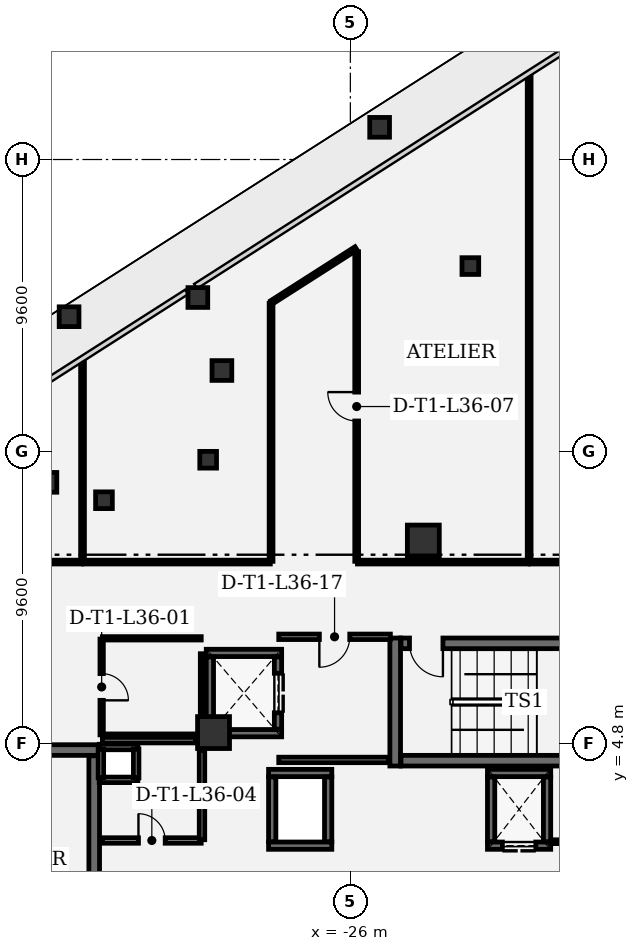
"""IFC4 building model, lengths in metres.
Left out: names, types, materials, properties, quantities, classifications, styles, units other than length and angle.
Written with IfcOpenShell. Run it as: python <this file> out.ifc"""

import sys

from ifc_helpers import new_model, si_unit, direction, frame, frame_2d, origin, origin_2d, place, context, subcontext, project, spatial, rectangle, extrude, element, fill, save


model = new_model("IFC4")
c1 = context("Model", 3, precision=1e-05, world=origin(), true_north=direction((0.0, 1.0)))
c2 = subcontext(c1, "Body", "Model", "MODEL_VIEW")
j1 = project(units=[si_unit("LENGTHUNIT", "METRE"), si_unit("PLANEANGLEUNIT", "RADIAN")], contexts=[c1])
p1 = place(None, origin())
s1 = spatial("IfcSite", under=j1, at=p1, CompositionType="ELEMENT")
p2 = place(p1, origin())
s2 = spatial("IfcBuilding", under=s1, at=p2, CompositionType="ELEMENT")
p3 = place(p2, frame((0.0, 0.0, 158.4)))
s3 = spatial("IfcBuildingStorey", under=s2, at=p3, CompositionType="ELEMENT", Elevation=158.4)
for number, where, z_axis, x_axis in (
    (1, (-23.6, 11.45, 0.0), (0.0, 0.0, 1.0), (1.0, 0.0, 0.0)),
    (2, (-30.5, 5.15, 0.0), (0.0, 0.0, 1.0), (1.0, 0.0, 0.0)),
):
    element("IfcColumn", number, at=place(p3, frame(where, z_axis=z_axis, x_axis=x_axis)), inside=s3, PredefinedType="COLUMN", context=c2, shape_type="SweptSolid", body=[
        extrude(rectangle(XDim=1.05, YDim=1.05, at=origin_2d()), origin(), (0.0, 0.0, 1.0), 4.05),
    ])
for number, where, z_axis, x_axis in (
    (3, (-35.252, 18.829, 0.0), (0.0, 0.0, 1.0), (1.0, 0.0, 0.0)),
    (4, (-25.038, 25.059, 0.0), (0.0, 0.0, 1.0), (1.0, 0.0, 0.0)),
    (5, (-31.016, 19.46, 0.0), (0.0, 0.0, 1.0), (1.0, 0.0, 0.0)),
    (6, (-35.981, 13.381, 0.0), (0.0, 0.0, 1.0), (1.0, 0.0, 0.0)),
    (7, (-30.225, 17.06, 0.0), (0.0, 0.0, 1.0), (1.0, 0.0, 0.0)),
):
    element("IfcColumn", number, at=place(p3, frame(where, z_axis=z_axis, x_axis=x_axis)), inside=s3, PredefinedType="COLUMN", context=c2, shape_type="SweptSolid", body=[
        extrude(rectangle(XDim=0.65, YDim=0.65, at=origin_2d()), origin(), (0.0, 0.0, 1.0), 4.05),
    ])
for number, where, z_axis, x_axis in (
    (8, (-34.104, 12.792, 0.0), (0.0, 0.0, 1.0), (1.0, 0.0, 0.0)),
    (9, (-22.053, 20.495, 0.0), (0.0, 0.0, 1.0), (1.0, 0.0, 0.0)),
    (10, (-30.677, 14.124, 0.0), (0.0, 0.0, 1.0), (1.0, 0.0, 0.0)),
):
    element("IfcColumn", number, at=place(p3, frame(where, z_axis=z_axis, x_axis=x_axis)), inside=s3, PredefinedType="COLUMN", context=c2, shape_type="SweptSolid", body=[
        extrude(rectangle(XDim=0.55, YDim=0.55, at=origin_2d()), origin(), (0.0, 0.0, 1.0), 4.05),
    ])
p4 = place(p3, frame((-24.525, 8.26, 0.0), z_axis=(0.0, 0.0, 1.0), x_axis=(0.0, -1.0, 0.0)))
e11 = element("IfcWall", 11, at=p4, inside=s3, PredefinedType="SHEAR", context=c2, shape_type="SweptSolid", body=[
    extrude(rectangle(XDim=4.21, YDim=0.35, at=frame_2d((2.105, 0.0))), origin(), (0.0, 0.0, 1.0), 3.78),
])
p5 = place(p3, frame((-24.335, 4.225, 0.0), z_axis=(0.0, 0.0, 1.0), x_axis=(1.0, 0.0, 0.0)))
e12 = element("IfcWall", 12, at=p5, inside=s3, PredefinedType="SHEAR", context=c2, shape_type="SweptSolid", body=[
    extrude(rectangle(XDim=8.12, YDim=0.35, at=frame_2d((4.06, 0.0))), origin(), (0.0, 0.0, 1.0), 3.78),
])
p6 = place(p3, frame((-16.215, 8.085, 0.0), z_axis=(0.0, 0.0, 1.0), x_axis=(-1.0, 0.0, 0.0)))
e13 = element("IfcWall", 13, at=p6, inside=s3, PredefinedType="SHEAR", context=c2, shape_type="SweptSolid", body=[
    extrude(rectangle(XDim=8.12, YDim=0.35, at=frame_2d((4.06, 0.0))), origin(), (0.0, 0.0, 1.0), 3.78),
])
p7 = place(p6, frame((6.74, 0.0, 0.0)))
e14 = element("IfcOpeningElement", 14, at=p7, cuts=e13, PredefinedType="OPENING", context=c2, shape_type="SweptSolid", body=[
    extrude(rectangle(XDim=1.1, YDim=2.2, at=frame_2d((0.55, 1.1))), frame((0.0, 0.185, 0.0), z_axis=(0.0, -1.0, 0.0), x_axis=(1.0, 0.0, 0.0)), (0.0, 0.0, 1.0), 0.37),
])
p8 = place(p3, frame((-34.25, 4.575, 0.0), z_axis=(0.0, 0.0, 1.0), x_axis=(-1.0, 0.0, 0.0)))
e15 = element("IfcWall", 15, at=p8, inside=s3, PredefinedType="SHEAR", context=c2, shape_type="SweptSolid", body=[
    extrude(rectangle(XDim=4.21, YDim=0.35, at=frame_2d((2.105, 0.0))), origin(), (0.0, 0.0, 1.0), 3.78),
])
p9 = place(p3, frame((-34.425, -4.385, 0.0), z_axis=(0.0, 0.0, 1.0), x_axis=(0.0, 1.0, 0.0)))
e16 = element("IfcWall", 16, at=p9, inside=s3, PredefinedType="SHEAR", context=c2, shape_type="SweptSolid", body=[
    extrude(rectangle(XDim=8.77, YDim=0.35, at=frame_2d((4.385, 0.0))), origin(), (0.0, 0.0, 1.0), 3.78),
])
for number, where, z_axis, x_axis in (
    (17, (-28.26, 5.13, 0.0), (0.0, 0.0, 1.0), (-1.0, 0.0, 0.0)),
    (18, (-30.74, 7.77, 0.0), (0.0, 0.0, 1.0), (1.0, 0.0, 0.0)),
):
    element("IfcWall", number, at=place(p3, frame(where, z_axis=z_axis, x_axis=x_axis)), inside=s3, PredefinedType="SHEAR", context=c2, shape_type="SweptSolid", body=[
        extrude(rectangle(XDim=2.48, YDim=0.24, at=frame_2d((1.24, 0.0))), origin(), (0.0, 0.0, 1.0), 3.78),
    ])
p10 = place(p3, frame((-30.62, 5.262, 0.0), z_axis=(0.0, 0.0, 1.0), x_axis=(0.0, 1.0, 0.0)))
e19 = element("IfcWall", 19, at=p10, inside=s3, PredefinedType="SHEAR", context=c2, shape_type="SweptSolid", body=[
    extrude(rectangle(XDim=2.376, YDim=0.24, at=frame_2d((1.188, 0.0))), origin(), (0.0, 0.0, 1.0), 3.78),
])
p11 = place(p3, frame((-28.38, 7.638, 0.0), z_axis=(0.0, 0.0, 1.0), x_axis=(0.0, -1.0, 0.0)))
e20 = element("IfcWall", 20, at=p11, inside=s3, PredefinedType="SHEAR", context=c2, shape_type="SweptSolid", body=[
    extrude(rectangle(XDim=2.376, YDim=0.24, at=frame_2d((1.188, 0.0))), origin(), (0.0, 0.0, 1.0), 3.78),
])
p12 = place(p11, frame((0.538, 0.0, 0.0)))
e21 = element("IfcOpeningElement", 21, at=p12, cuts=e20, PredefinedType="OPENING", context=c2, shape_type="SweptSolid", body=[
    extrude(rectangle(XDim=1.3, YDim=2.3, at=frame_2d((0.65, 1.15))), frame((0.0, 0.13, 0.0), z_axis=(0.0, -1.0, 0.0), x_axis=(1.0, 0.0, 0.0)), (0.0, 0.0, 1.0), 0.26),
])
for number, where, z_axis, x_axis in (
    (22, (-26.61, 1.43, 0.0), (0.0, 0.0, 1.0), (-1.0, 0.0, 0.0)),
    (23, (-28.69, 3.82, 0.0), (0.0, 0.0, 1.0), (1.0, 0.0, 0.0)),
):
    element("IfcWall", number, at=place(p3, frame(where, z_axis=z_axis, x_axis=x_axis)), inside=s3, PredefinedType="SHEAR", context=c2, shape_type="SweptSolid", body=[
        extrude(rectangle(XDim=2.08, YDim=0.24, at=frame_2d((1.04, 0.0))), origin(), (0.0, 0.0, 1.0), 3.78),
    ])
for number, where, z_axis, x_axis in (
    (24, (-28.57, 1.562, 0.0), (0.0, 0.0, 1.0), (0.0, 1.0, 0.0)),
    (25, (-26.73, 3.688, 0.0), (0.0, 0.0, 1.0), (0.0, -1.0, 0.0)),
):
    element("IfcWall", number, at=place(p3, frame(where, z_axis=z_axis, x_axis=x_axis)), inside=s3, PredefinedType="SHEAR", context=c2, shape_type="SweptSolid", body=[
        extrude(rectangle(XDim=2.126, YDim=0.24, at=frame_2d((1.063, 0.0))), origin(), (0.0, 0.0, 1.0), 3.78),
    ])
p13 = place(p3, frame((-19.41, 1.43, 0.0), z_axis=(0.0, 0.0, 1.0), x_axis=(-1.0, 0.0, 0.0)))
e26 = element("IfcWall", 26, at=p13, inside=s3, PredefinedType="SHEAR", context=c2, shape_type="SweptSolid", body=[
    extrude(rectangle(XDim=2.08, YDim=0.24, at=frame_2d((1.04, 0.0))), origin(), (0.0, 0.0, 1.0), 3.78),
])
p14 = place(p13, frame((0.49, 0.0, 0.0)))
e27 = element("IfcOpeningElement", 27, at=p14, cuts=e26, PredefinedType="OPENING", context=c2, shape_type="SweptSolid", body=[
    extrude(rectangle(XDim=1.1, YDim=2.2, at=frame_2d((0.55, 1.1))), frame((0.0, 0.13, 0.0), z_axis=(0.0, -1.0, 0.0), x_axis=(1.0, 0.0, 0.0)), (0.0, 0.0, 1.0), 0.26),
])
p15 = place(p3, frame((-21.49, 3.82, 0.0), z_axis=(0.0, 0.0, 1.0), x_axis=(1.0, 0.0, 0.0)))
e28 = element("IfcWall", 28, at=p15, inside=s3, PredefinedType="SHEAR", context=c2, shape_type="SweptSolid", body=[
    extrude(rectangle(XDim=2.08, YDim=0.24, at=frame_2d((1.04, 0.0))), origin(), (0.0, 0.0, 1.0), 3.78),
])
for number, where, z_axis, x_axis in (
    (29, (-21.37, 1.562, 0.0), (0.0, 0.0, 1.0), (0.0, 1.0, 0.0)),
    (30, (-19.53, 3.688, 0.0), (0.0, 0.0, 1.0), (0.0, -1.0, 0.0)),
):
    element("IfcWall", number, at=place(p3, frame(where, z_axis=z_axis, x_axis=x_axis)), inside=s3, PredefinedType="SHEAR", context=c2, shape_type="SweptSolid", body=[
        extrude(rectangle(XDim=2.126, YDim=0.24, at=frame_2d((1.063, 0.0))), origin(), (0.0, 0.0, 1.0), 3.78),
    ])
for number, where, z_axis, x_axis in (
    (31, (-32.99, 3.595, 0.0), (0.0, 0.0, 1.0), (-1.0, 0.0, 0.0)),
    (32, (-34.26, 4.675, 0.0), (0.0, 0.0, 1.0), (1.0, 0.0, 0.0)),
):
    element("IfcWall", number, at=place(p3, frame(where, z_axis=z_axis, x_axis=x_axis)), inside=s3, PredefinedType="PARTITIONING", context=c2, shape_type="SweptSolid", body=[
        extrude(rectangle(XDim=1.27, YDim=0.18, at=frame_2d((0.635, 0.0))), origin(), (0.0, 0.0, 1.0), 3.78),
    ])
for number, where, z_axis, x_axis in (
    (33, (-34.205, 3.66, 0.0), (0.0, 0.0, 1.0), (0.0, 1.0, 0.0)),
    (34, (-33.045, 4.61, 0.0), (0.0, 0.0, 1.0), (0.0, -1.0, 0.0)),
):
    element("IfcWall", number, at=place(p3, frame(where, z_axis=z_axis, x_axis=x_axis)), inside=s3, PredefinedType="PARTITIONING", context=c2, shape_type="SweptSolid", body=[
        extrude(rectangle(XDim=0.95, YDim=0.18, at=frame_2d((0.475, 0.0))), origin(), (0.0, 0.0, 1.0), 3.78),
    ])
p16 = place(p3, frame((-28.355, 4.25, 0.0), z_axis=(0.0, 0.0, 1.0), x_axis=(1.0, 0.0, 0.0)))
e35 = element("IfcWall", 35, at=p16, inside=s3, PredefinedType="PARTITIONING", context=c2, shape_type="SweptSolid", body=[
    extrude(rectangle(XDim=3.622, YDim=0.18, at=frame_2d((1.811, 0.0))), origin(), (0.0, 0.0, 1.0), 3.78),
])
p17 = place(p3, frame((-24.684, 8.3, 0.0), z_axis=(0.0, 0.0, 1.0), x_axis=(-1.0, 0.0, 0.0)))
e36 = element("IfcWall", 36, at=p17, inside=s3, PredefinedType="PARTITIONING", context=c2, shape_type="SweptSolid", body=[
    extrude(rectangle(XDim=3.671, YDim=0.18, at=frame_2d((1.835, 0.0))), origin(), (0.0, 0.0, 1.0), 3.78),
])
p18 = place(p17, frame((1.335, 0.0, 0.0)))
e37 = element("IfcOpeningElement", 37, at=p18, cuts=e36, PredefinedType="OPENING", context=c2, shape_type="SweptSolid", body=[
    extrude(rectangle(XDim=1.0, YDim=2.15, at=frame_2d((0.5, 1.075))), frame((0.0, 0.1, 0.0), z_axis=(0.0, -1.0, 0.0), x_axis=(1.0, 0.0, 0.0)), (0.0, 0.0, 1.0), 0.2),
])
p19 = place(p3, frame((-34.18, 8.225, 0.0), z_axis=(0.0, 0.0, 1.0), x_axis=(0.0, -1.0, 0.0)))
e38 = element("IfcWall", 38, at=p19, inside=s3, PredefinedType="PARTITIONING", context=c2, shape_type="SweptSolid", body=[
    extrude(rectangle(XDim=3.15, YDim=0.11, at=frame_2d((1.575, 0.0))), origin(), (0.0, 0.0, 1.0), 3.78),
])
p20 = place(p19, frame((1.135, 0.0, 0.0)))
e39 = element("IfcOpeningElement", 39, at=p20, cuts=e38, PredefinedType="OPENING", context=c2, shape_type="SweptSolid", body=[
    extrude(rectangle(XDim=0.88, YDim=2.1, at=frame_2d((0.44, 1.05))), frame((0.0, 0.065, 0.0), z_axis=(0.0, -1.0, 0.0), x_axis=(1.0, 0.0, 0.0)), (0.0, 0.0, 1.0), 0.13),
])
p21 = place(p3, frame((-34.155, 5.05, 0.0), z_axis=(0.0, 0.0, 1.0), x_axis=(1.0, 0.0, 0.0)))
e40 = element("IfcWall", 40, at=p21, inside=s3, PredefinedType="PARTITIONING", context=c2, shape_type="SweptSolid", body=[
    extrude(rectangle(XDim=3.065, YDim=0.11, at=frame_2d((1.532, 0.0))), origin(), (0.0, 0.0, 1.0), 3.78),
])
p22 = place(p3, frame((-30.88, 5.74, 0.0), z_axis=(0.0, 0.0, 1.0), x_axis=(0.0, 1.0, 0.0)))
e41 = element("IfcWall", 41, at=p22, inside=s3, PredefinedType="PARTITIONING", context=c2, shape_type="SweptSolid", body=[
    extrude(rectangle(XDim=2.003, YDim=0.11, at=frame_2d((1.001, 0.0))), origin(), (0.0, 0.0, 1.0), 3.78),
])
p23 = place(p3, frame((-30.905, 8.25, 0.0), z_axis=(0.0, 0.0, 1.0), x_axis=(-1.0, 0.0, 0.0)))
e42 = element("IfcWall", 42, at=p23, inside=s3, PredefinedType="PARTITIONING", context=c2, shape_type="SweptSolid", body=[
    extrude(rectangle(XDim=3.25, YDim=0.11, at=frame_2d((1.625, 0.0))), origin(), (0.0, 0.0, 1.0), 3.78),
])
p24 = place(p3, frame((-19.334, 1.56, 0.0), z_axis=(0.0, 0.0, 1.0), x_axis=(1.0, 0.0, 0.0)))
e43 = element("IfcWall", 43, at=p24, inside=s3, PredefinedType="PARTITIONING", context=c2, shape_type="SweptSolid", body=[
    extrude(rectangle(XDim=3.309, YDim=0.125, at=frame_2d((1.654, 0.0))), origin(), (0.0, 0.0, 1.0), 3.78),
])
p25 = place(p24, frame((1.179, 0.0, 0.0)))
e44 = element("IfcOpeningElement", 44, at=p25, cuts=e43, PredefinedType="OPENING", context=c2, shape_type="SweptSolid", body=[
    extrude(rectangle(XDim=0.95, YDim=2.15, at=frame_2d((0.475, 1.075))), frame((0.0, 0.073, 0.0), z_axis=(0.0, -1.0, 0.0), x_axis=(1.0, 0.0, 0.0)), (0.0, 0.0, 1.0), 0.145),
])
p26 = place(p3, frame((-34.155, 1.6, 0.0), z_axis=(0.0, 0.0, 1.0), x_axis=(1.0, 0.0, 0.0)))
e45 = element("IfcWall", 45, at=p26, inside=s3, PredefinedType="PARTITIONING", context=c2, shape_type="SweptSolid", body=[
    extrude(rectangle(XDim=3.25, YDim=0.18, at=frame_2d((1.625, 0.0))), origin(), (0.0, 0.0, 1.0), 3.78),
])
p27 = place(p26, frame((1.185, 0.0, 0.0)))
e46 = element("IfcOpeningElement", 46, at=p27, cuts=e45, PredefinedType="OPENING", context=c2, shape_type="SweptSolid", body=[
    extrude(rectangle(XDim=0.88, YDim=2.1, at=frame_2d((0.44, 1.05))), frame((0.0, 0.1, 0.0), z_axis=(0.0, -1.0, 0.0), x_axis=(1.0, 0.0, 0.0)), (0.0, 0.0, 1.0), 0.2),
])
p28 = place(p3, frame((-30.88, 1.625, 0.0), z_axis=(0.0, 0.0, 1.0), x_axis=(0.0, 1.0, 0.0)))
e47 = element("IfcWall", 47, at=p28, inside=s3, PredefinedType="PARTITIONING", context=c2, shape_type="SweptSolid", body=[
    extrude(rectangle(XDim=2.935, YDim=0.18, at=frame_2d((1.468, 0.0))), origin(), (0.0, 0.0, 1.0), 3.78),
])
p29 = place(p3, frame((-31.09, 4.9, 0.0), z_axis=(0.0, 0.0, 1.0), x_axis=(-1.0, 0.0, 0.0)))
e48 = element("IfcWall", 48, at=p29, inside=s3, PredefinedType="PARTITIONING", context=c2, shape_type="SweptSolid", body=[
    extrude(rectangle(XDim=3.065, YDim=0.18, at=frame_2d((1.532, 0.0))), origin(), (0.0, 0.0, 1.0), 3.78),
])
p30 = place(p3, frame((-37.833, 10.758, 0.0), z_axis=(0.0, 0.0, 1.0), x_axis=(1.0, 0.0, 0.0)))
e49 = element("IfcWall", 49, at=p30, inside=s3, PredefinedType="PARTITIONING", context=c2, shape_type="SweptSolid", body=[
    extrude(rectangle(XDim=2.999, YDim=0.125, at=frame_2d((1.5, 0.0))), origin(), (0.0, 0.0, 1.0), 3.344),
])
p31 = place(p30, frame((1.024, 0.0, 0.0)))
e50 = element("IfcOpeningElement", 50, at=p31, cuts=e49, PredefinedType="OPENING", context=c2, shape_type="SweptSolid", body=[
    extrude(rectangle(XDim=0.95, YDim=2.15, at=frame_2d((0.475, 1.075))), frame((0.0, 0.073, 0.0), z_axis=(0.0, -1.0, 0.0), x_axis=(1.0, 0.0, 0.0)), (0.0, 0.0, 1.0), 0.145),
])
p32 = place(p3, frame((-34.809, 10.783, 0.0), z_axis=(0.0, 0.0, 1.0), x_axis=(0.0, 1.0, 0.0)))
e51 = element("IfcWall", 51, at=p32, inside=s3, PredefinedType="PARTITIONING", context=c2, shape_type="SweptSolid", body=[
    extrude(rectangle(XDim=6.592, YDim=0.125, at=frame_2d((3.296, 0.0))), origin(), (0.0, 0.0, 1.0), 3.78),
])
p33 = place(p3, frame((-34.776, 10.758, 0.0), z_axis=(0.0, 0.0, 1.0), x_axis=(1.0, 0.0, 0.0)))
e52 = element("IfcWall", 52, at=p33, inside=s3, PredefinedType="PARTITIONING", context=c2, shape_type="SweptSolid", body=[
    extrude(rectangle(XDim=6.144, YDim=0.125, at=frame_2d((3.072, 0.0))), origin(), (0.0, 0.0, 1.0), 3.344),
])
p34 = place(p3, frame((-28.608, 19.267, 0.0), z_axis=(0.0, 0.0, 1.0), x_axis=(0.0, -1.0, 0.0)))
e53 = element("IfcWall", 53, at=p34, inside=s3, PredefinedType="PARTITIONING", context=c2, shape_type="SweptSolid", body=[
    extrude(rectangle(XDim=8.483, YDim=0.125, at=frame_2d((4.242, 0.0))), origin(), (0.0, 0.0, 1.0), 3.78),
])
p35 = place(p3, frame((-25.813, 21.078, 0.0), z_axis=(0.0, 0.0, 1.0), x_axis=(-0.842597176941, -0.538544331891, 0.0)))
e54 = element("IfcWall", 54, at=p35, inside=s3, PredefinedType="PARTITIONING", context=c2, shape_type="SweptSolid", body=[
    extrude(rectangle(XDim=3.292, YDim=0.125, at=frame_2d((1.646, 0.0))), origin(), (0.0, 0.0, 1.0), 3.78),
])
p36 = place(p3, frame((-25.792, 10.783, 0.0), z_axis=(0.0, 0.0, 1.0), x_axis=(0.0, 1.0, 0.0)))
e55 = element("IfcWall", 55, at=p36, inside=s3, PredefinedType="PARTITIONING", context=c2, shape_type="SweptSolid", body=[
    extrude(rectangle(XDim=10.182, YDim=0.125, at=frame_2d((5.091, 0.0))), origin(), (0.0, 0.0, 1.0), 3.78),
])
p37 = place(p36, frame((4.616, 0.0, 0.0)))
e56 = element("IfcOpeningElement", 56, at=p37, cuts=e55, PredefinedType="OPENING", context=c2, shape_type="SweptSolid", body=[
    extrude(rectangle(XDim=0.95, YDim=2.15, at=frame_2d((0.475, 1.075))), frame((0.0, 0.073, 0.0), z_axis=(0.0, -1.0, 0.0), x_axis=(1.0, 0.0, 0.0)), (0.0, 0.0, 1.0), 0.145),
])
p38 = place(p3, frame((-25.767, 10.758, 0.0), z_axis=(0.0, 0.0, 1.0), x_axis=(1.0, 0.0, 0.0)))
e57 = element("IfcWall", 57, at=p38, inside=s3, PredefinedType="PARTITIONING", context=c2, shape_type="SweptSolid", body=[
    extrude(rectangle(XDim=5.623, YDim=0.125, at=frame_2d((2.812, 0.0))), origin(), (0.0, 0.0, 1.0), 3.78),
])
p39 = place(p3, frame((-20.119, 10.783, 0.0), z_axis=(0.0, 0.0, 1.0), x_axis=(0.0, 1.0, 0.0)))
e58 = element("IfcWall", 58, at=p39, inside=s3, PredefinedType="PARTITIONING", context=c2, shape_type="SweptSolid", body=[
    extrude(rectangle(XDim=15.981, YDim=0.125, at=frame_2d((7.99, 0.0))), origin(), (0.0, 0.0, 1.0), 2.895),
])
p40 = place(p3, frame((-20.086, 10.758, 0.0), z_axis=(0.0, 0.0, 1.0), x_axis=(1.0, 0.0, 0.0)))
e59 = element("IfcWall", 59, at=p40, inside=s3, PredefinedType="PARTITIONING", context=c2, shape_type="SweptSolid", body=[
    extrude(rectangle(XDim=11.534, YDim=0.125, at=frame_2d((5.767, 0.0))), origin(), (0.0, 0.0, 1.0), 2.895),
])
p41 = place(p40, frame((5.292, 0.0, 0.0)))
e60 = element("IfcOpeningElement", 60, at=p41, cuts=e59, PredefinedType="OPENING", context=c2, shape_type="SweptSolid", body=[
    extrude(rectangle(XDim=0.95, YDim=2.15, at=frame_2d((0.475, 1.075))), frame((0.0, 0.073, 0.0), z_axis=(0.0, -1.0, 0.0), x_axis=(1.0, 0.0, 0.0)), (0.0, 0.0, 1.0), 0.145),
])
p42 = place(p7, origin())
e61 = element("IfcDoor", 61, at=p42, inside=s3, OperationType="SINGLE_SWING_LEFT", PredefinedType="DOOR", context=c2, shape_type="SweptSolid", body=[
    extrude(rectangle(XDim=1.1, YDim=2.2, at=frame_2d((0.55, 1.1))), frame((0.0, 0.025, 0.0), z_axis=(0.0, -1.0, 0.0), x_axis=(1.0, 0.0, 0.0)), (0.0, 0.0, 1.0), 0.05),
])
fill(e14, e61)
p43 = place(p12, origin())
e62 = element("IfcDoor", 62, at=p43, inside=s3, OperationType="DOUBLE_DOOR_SLIDING", PredefinedType="DOOR", context=c2, shape_type="SweptSolid", body=[
    extrude(rectangle(XDim=1.3, YDim=2.3, at=frame_2d((0.65, 1.15))), frame((0.0, 0.025, 0.0), z_axis=(0.0, -1.0, 0.0), x_axis=(1.0, 0.0, 0.0)), (0.0, 0.0, 1.0), 0.05),
])
fill(e21, e62)
p44 = place(p14, origin())
e63 = element("IfcDoor", 63, at=p44, inside=s3, OperationType="DOUBLE_DOOR_SLIDING", PredefinedType="DOOR", context=c2, shape_type="SweptSolid", body=[
    extrude(rectangle(XDim=1.1, YDim=2.2, at=frame_2d((0.55, 1.1))), frame((0.0, 0.025, 0.0), z_axis=(0.0, -1.0, 0.0), x_axis=(1.0, 0.0, 0.0)), (0.0, 0.0, 1.0), 0.05),
])
fill(e27, e63)
p45 = place(p20, origin())
e64 = element("IfcDoor", 64, at=p45, inside=s3, OperationType="SINGLE_SWING_RIGHT", PredefinedType="DOOR", context=c2, shape_type="SweptSolid", body=[
    extrude(rectangle(XDim=0.88, YDim=2.1, at=frame_2d((0.44, 1.05))), frame((0.0, 0.025, 0.0), z_axis=(0.0, -1.0, 0.0), x_axis=(1.0, 0.0, 0.0)), (0.0, 0.0, 1.0), 0.05),
])
fill(e39, e64)
p46 = place(p27, origin())
e65 = element("IfcDoor", 65, at=p46, inside=s3, OperationType="SINGLE_SWING_LEFT", PredefinedType="DOOR", context=c2, shape_type="SweptSolid", body=[
    extrude(rectangle(XDim=0.88, YDim=2.1, at=frame_2d((0.44, 1.05))), frame((0.0, 0.025, 0.0), z_axis=(0.0, -1.0, 0.0), x_axis=(1.0, 0.0, 0.0)), (0.0, 0.0, 1.0), 0.05),
])
fill(e46, e65)
p47 = place(p37, origin())
e66 = element("IfcDoor", 66, at=p47, inside=s3, OperationType="SINGLE_SWING_RIGHT", PredefinedType="DOOR", context=c2, shape_type="SweptSolid", body=[
    extrude(rectangle(XDim=0.95, YDim=2.15, at=frame_2d((0.475, 1.075))), frame((0.0, 0.025, 0.0), z_axis=(0.0, -1.0, 0.0), x_axis=(1.0, 0.0, 0.0)), (0.0, 0.0, 1.0), 0.05),
])
fill(e56, e66)
p48 = place(p18, origin())
e67 = element("IfcDoor", 67, at=p48, inside=s3, OperationType="SINGLE_SWING_RIGHT", PredefinedType="DOOR", context=c2, shape_type="SweptSolid", body=[
    extrude(rectangle(XDim=1.0, YDim=2.15, at=frame_2d((0.5, 1.075))), frame((0.0, 0.025, 0.0), z_axis=(0.0, -1.0, 0.0), x_axis=(1.0, 0.0, 0.0)), (0.0, 0.0, 1.0), 0.05),
])
fill(e37, e67)
save(model, sys.argv[1])
